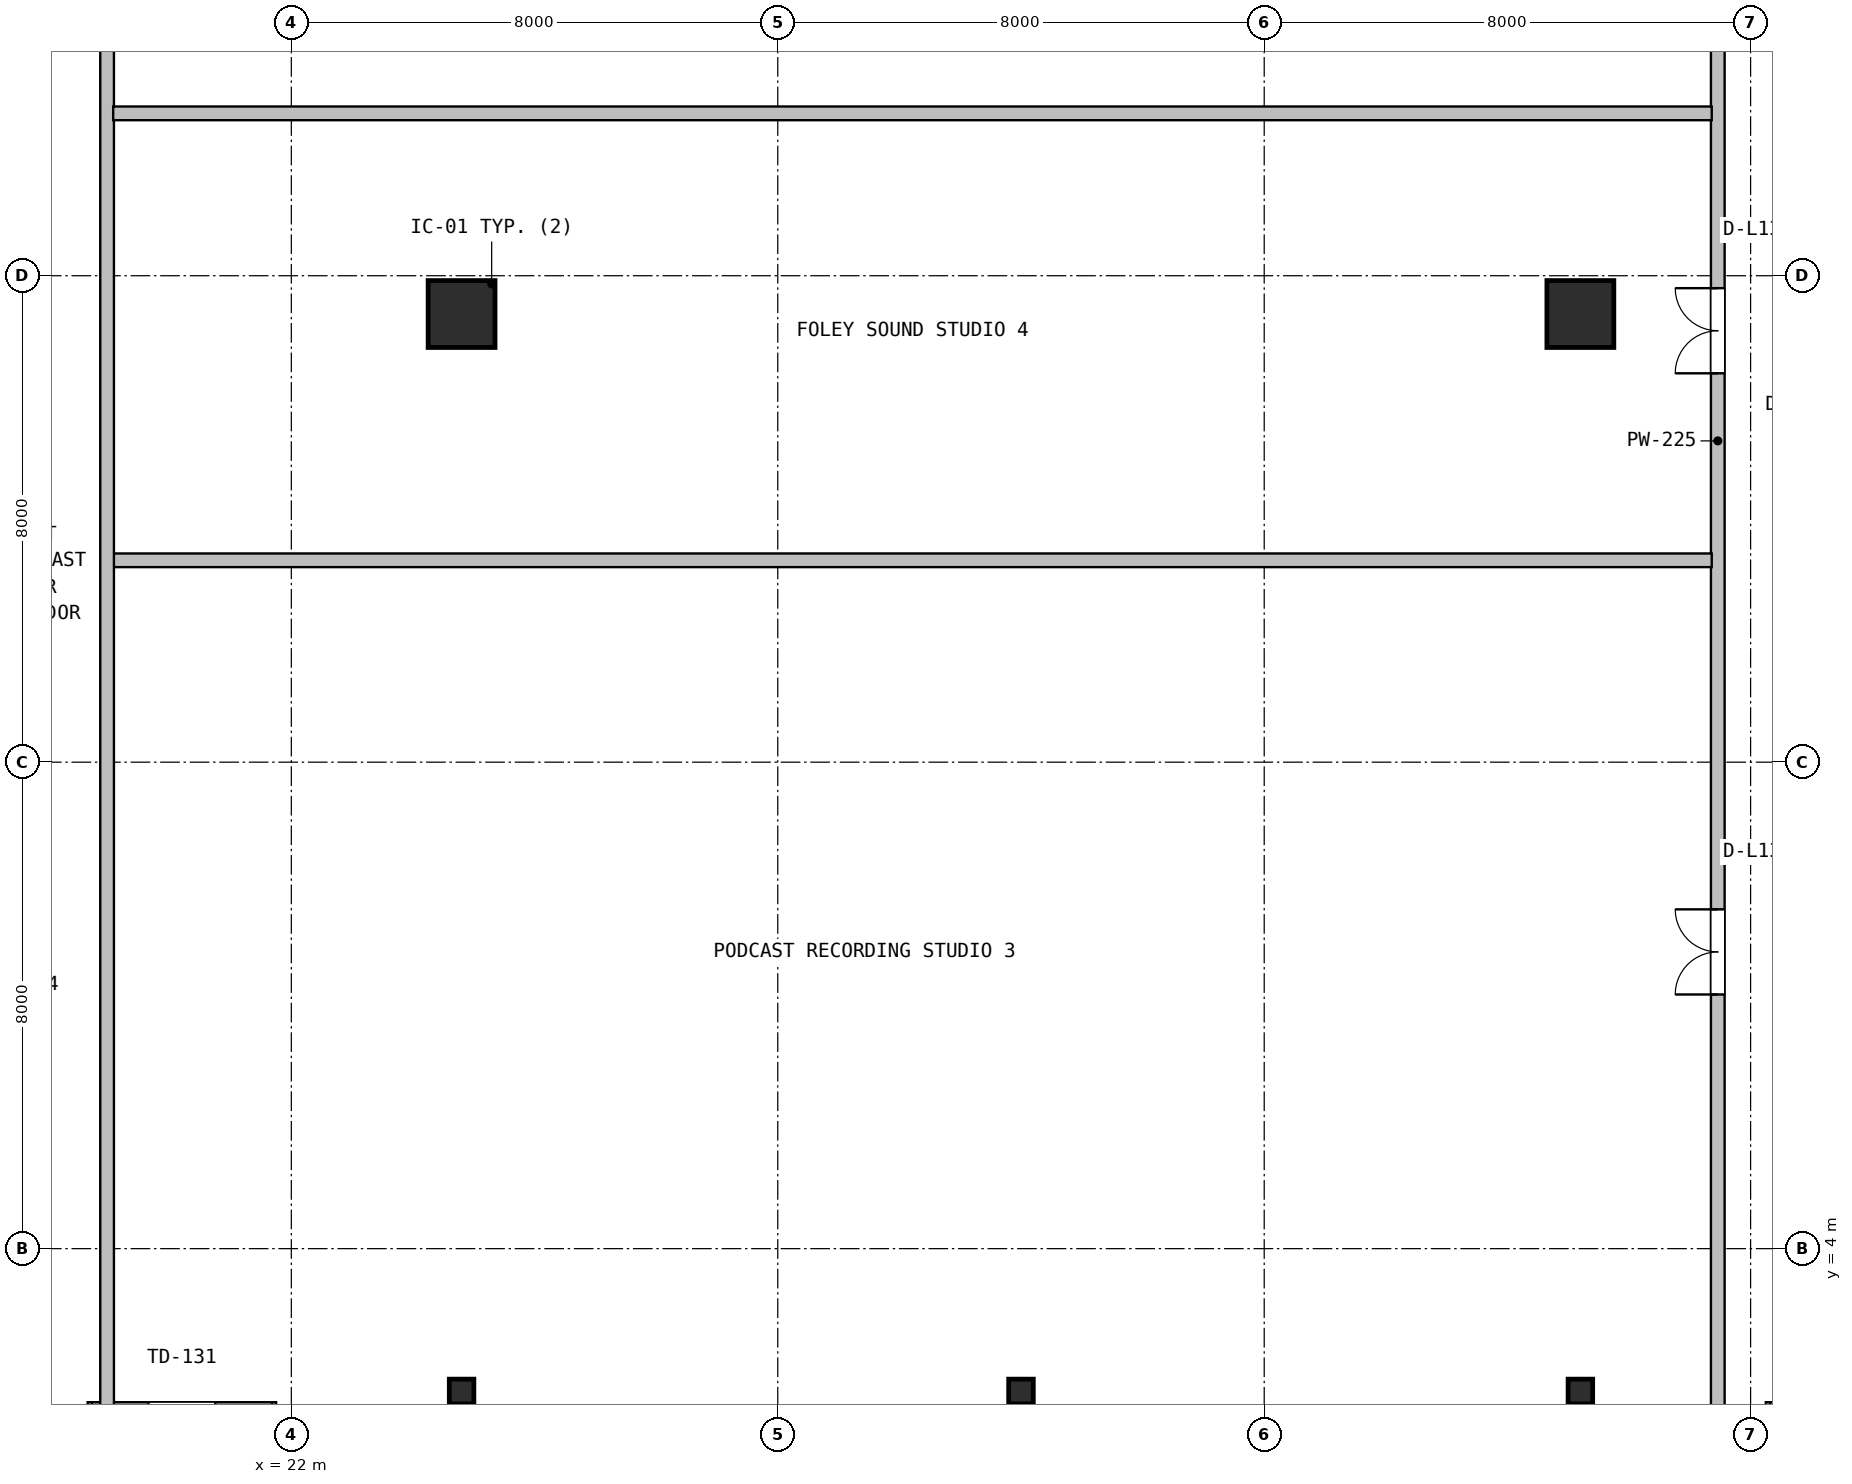
"""IFC4 building model, lengths in metres.
Left out: names, types, materials, properties, quantities, classifications, styles, units other than length and angle.
Written with IfcOpenShell. Run it as: python <this file> out.ifc"""

import sys

from ifc_helpers import new_model, si_unit, direction, frame, frame_2d, origin, origin_2d, place, context, subcontext, project, spatial, rectangle, i_section, extrude, source, transform, mapped, element, fill, save


model = new_model("IFC4")
c1 = context("Model", 3, precision=1e-05, world=origin(), true_north=direction((0.0, 1.0)))
c2 = subcontext(c1, "Body", "Model", "MODEL_VIEW")
j1 = project(units=[si_unit("LENGTHUNIT", "METRE"), si_unit("PLANEANGLEUNIT", "RADIAN")], contexts=[c1])
p1 = place(None, origin())
s1 = spatial("IfcSite", under=j1, at=p1, CompositionType="ELEMENT")
p2 = place(p1, origin())
s2 = spatial("IfcBuilding", under=s1, at=p2, CompositionType="ELEMENT")
p3 = place(p2, frame((0.0, 0.0, 58.8)))
s3 = spatial("IfcBuildingStorey", under=s2, at=p3, CompositionType="ELEMENT", Elevation=58.8)
m1 = source(origin(), c2, "Body", "SweptSolid", [
    extrude(i_section(OverallWidth=0.404, OverallDepth=0.407, WebThickness=0.027, FlangeThickness=0.044, FilletRadius=0.018, at=origin_2d()), origin(), (0.0, 0.0, 1.0), 3.9),
])
for number, where, z_axis, x_axis in (
    (1, (24.8, 1.65, 0.0), (0.0, 0.0, 1.0), (1.0, 0.0, 0.0)),
    (2, (34.0, 1.65, 0.0), (0.0, 0.0, 1.0), (1.0, 0.0, 0.0)),
    (3, (43.2, 1.65, 0.0), (0.0, 0.0, 1.0), (1.0, 0.0, 0.0)),
):
    element("IfcColumn", number, at=place(p3, frame(where, z_axis=z_axis, x_axis=x_axis)), inside=s3, PredefinedType="COLUMN", context=c2, shape_type="MappedRepresentation", body=[
        mapped(m1, transform((0.0, 0.0, 0.0), x_axis=(1.0, 0.0, 0.0), y_axis=(0.0, 1.0, 0.0), z_axis=(0.0, 0.0, 1.0), scale=1.0)),
    ])
m2 = source(origin(), c2, "Body", "SweptSolid", [
    extrude(rectangle(XDim=1.1, YDim=1.1, at=origin_2d()), origin(), (0.0, 0.0, 1.0), 3.9),
])
for number, where, z_axis, x_axis in (
    (4, (24.8, 19.37, 0.0), (0.0, 0.0, 1.0), (1.0, 0.0, 0.0)),
    (5, (43.2, 19.37, 0.0), (0.0, 0.0, 1.0), (1.0, 0.0, 0.0)),
):
    element("IfcColumn", number, at=place(p3, frame(where, z_axis=z_axis, x_axis=x_axis)), inside=s3, PredefinedType="COLUMN", context=c2, shape_type="MappedRepresentation", body=[
        mapped(m2, transform((0.0, 0.0, 0.0), x_axis=(1.0, 0.0, 0.0), y_axis=(0.0, 1.0, 0.0), z_axis=(0.0, 0.0, 1.0), scale=1.0)),
    ])
p4 = place(p3, frame((18.65, 1.35, 0.0), z_axis=(0.0, 0.0, 1.0), x_axis=(1.0, 0.0, 0.0)))
e6 = element("IfcWall", 6, at=p4, inside=s3, PredefinedType="SOLIDWALL", context=c2, shape_type="SweptSolid", body=[
    extrude(rectangle(XDim=3.1, YDim=0.25, at=frame_2d((1.55, 0.0))), origin(), (0.0, 0.0, 1.0), 3.63),
])
p5 = place(p4, frame((1.0, 0.0, 0.0)))
e7 = element("IfcOpeningElement", 7, at=p5, cuts=e6, PredefinedType="OPENING", context=c2, shape_type="SweptSolid", body=[
    extrude(rectangle(XDim=1.1, YDim=2.15, at=frame_2d((0.55, 1.075))), frame((0.0, 0.135, 0.0), z_axis=(0.0, -1.0, 0.0), x_axis=(1.0, 0.0, 0.0)), (0.0, 0.0, 1.0), 0.27),
])
p6 = place(p3, frame((46.25, 1.35, 0.0), z_axis=(0.0, 0.0, 1.0), x_axis=(1.0, 0.0, 0.0)))
e8 = element("IfcWall", 8, at=p6, inside=s3, PredefinedType="SOLIDWALL", context=c2, shape_type="SweptSolid", body=[
    extrude(rectangle(XDim=3.1, YDim=0.25, at=frame_2d((1.55, 0.0))), origin(), (0.0, 0.0, 1.0), 3.63),
])
p7 = place(p6, frame((1.0, 0.0, 0.0)))
e9 = element("IfcOpeningElement", 9, at=p7, cuts=e8, PredefinedType="OPENING", context=c2, shape_type="SweptSolid", body=[
    extrude(rectangle(XDim=1.1, YDim=2.15, at=frame_2d((0.55, 1.075))), frame((0.0, 0.135, 0.0), z_axis=(0.0, -1.0, 0.0), x_axis=(1.0, 0.0, 0.0)), (0.0, 0.0, 1.0), 0.27),
])
p8 = place(p3, frame((45.46, 1.38, 0.0), z_axis=(0.0, 0.0, 1.0), x_axis=(0.0, 1.0, 0.0)))
e10 = element("IfcWall", 10, at=p8, inside=s3, PredefinedType="PARTITIONING", context=c2, shape_type="SweptSolid", body=[
    extrude(rectangle(XDim=31.808, YDim=0.225, at=frame_2d((15.904, 0.0))), origin(), (0.0, 0.0, 1.0), 3.208),
])
p9 = place(p8, frame((6.8, 0.0, 0.0)))
e11 = element("IfcOpeningElement", 11, at=p9, cuts=e10, PredefinedType="OPENING", context=c2, shape_type="SweptSolid", body=[
    extrude(rectangle(XDim=1.4, YDim=2.12, at=frame_2d((0.7, 1.06))), frame((0.0, 0.123, 0.0), z_axis=(0.0, -1.0, 0.0), x_axis=(1.0, 0.0, 0.0)), (0.0, 0.0, 1.0), 0.245),
])
p10 = place(p8, frame((17.015, 0.0, 0.0)))
e12 = element("IfcOpeningElement", 12, at=p10, cuts=e10, PredefinedType="OPENING", context=c2, shape_type="SweptSolid", body=[
    extrude(rectangle(XDim=1.4, YDim=2.12, at=frame_2d((0.7, 1.06))), frame((0.0, 0.123, 0.0), z_axis=(0.0, -1.0, 0.0), x_axis=(1.0, 0.0, 0.0)), (0.0, 0.0, 1.0), 0.245),
])
p11 = place(p3, frame((19.07, 15.32, 0.0), z_axis=(0.0, 0.0, 1.0), x_axis=(1.0, 0.0, 0.0)))
e13 = element("IfcWall", 13, at=p11, inside=s3, PredefinedType="PARTITIONING", context=c2, shape_type="SweptSolid", body=[
    extrude(rectangle(XDim=26.29, YDim=0.225, at=frame_2d((13.145, 0.0))), origin(), (0.0, 0.0, 1.0), 2.852),
])
p12 = place(p3, frame((18.97, 1.38, 0.0), z_axis=(0.0, 0.0, 1.0), x_axis=(0.0, 1.0, 0.0)))
e14 = element("IfcWall", 14, at=p12, inside=s3, PredefinedType="PARTITIONING", context=c2, shape_type="SweptSolid", body=[
    extrude(rectangle(XDim=31.808, YDim=0.225, at=frame_2d((15.904, 0.0))), origin(), (0.0, 0.0, 1.0), 3.208),
])
p13 = place(p3, frame((19.07, 22.67, 0.0), z_axis=(0.0, 0.0, 1.0), x_axis=(1.0, 0.0, 0.0)))
e15 = element("IfcWall", 15, at=p13, inside=s3, PredefinedType="PARTITIONING", context=c2, shape_type="SweptSolid", body=[
    extrude(rectangle(XDim=26.29, YDim=0.225, at=frame_2d((13.145, 0.0))), origin(), (0.0, 0.0, 1.0), 2.852),
])
m3 = source(origin(), c2, "Body", "SweptSolid", [
    extrude(rectangle(XDim=1.4, YDim=2.12, at=frame_2d((0.7, 1.06))), frame((0.0, 0.025, 0.0), z_axis=(0.0, -1.0, 0.0), x_axis=(1.0, 0.0, 0.0)), (0.0, 0.0, 1.0), 0.05),
])
p14 = place(p9, origin())
e16 = element("IfcDoor", 16, at=p14, inside=s3, OperationType="DOUBLE_DOOR_SINGLE_SWING", PredefinedType="DOOR", context=c2, shape_type="MappedRepresentation", body=[
    mapped(m3, transform((0.0, 0.0, 0.0), x_axis=(1.0, 0.0, 0.0), y_axis=(0.0, 1.0, 0.0), z_axis=(0.0, 0.0, 1.0), scale=1.0)),
])
fill(e11, e16)
p15 = place(p10, origin())
e17 = element("IfcDoor", 17, at=p15, inside=s3, OperationType="DOUBLE_DOOR_SINGLE_SWING", PredefinedType="DOOR", context=c2, shape_type="MappedRepresentation", body=[
    mapped(m3, transform((0.0, 0.0, 0.0), x_axis=(1.0, 0.0, 0.0), y_axis=(0.0, 1.0, 0.0), z_axis=(0.0, 0.0, 1.0), scale=1.0)),
])
fill(e12, e17)
save(model, sys.argv[1])
